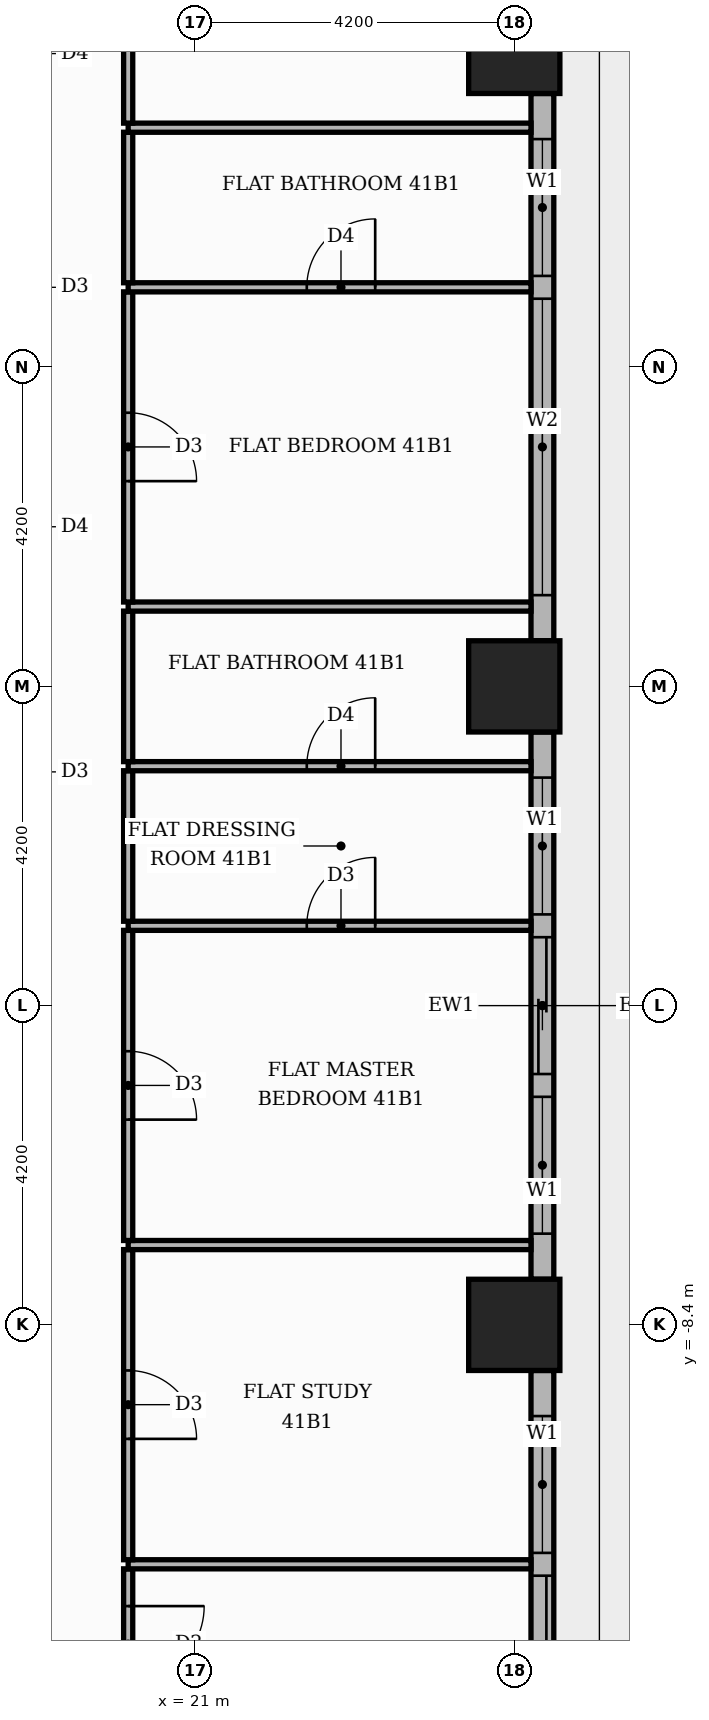
"""IFC4 building model, lengths in metres.
Left out: names, types, materials, properties, quantities, classifications, styles, units other than length and angle.
Written with IfcOpenShell. Run it as: python <this file> out.ifc"""

import sys

from ifc_helpers import new_model, si_unit, direction, frame, frame_2d, origin, origin_2d, place, context, subcontext, project, spatial, rectangle, extrude, element, fill, save


model = new_model("IFC4")
c1 = context("Model", 3, precision=1e-05, world=origin(), true_north=direction((0.0, 1.0)))
c2 = subcontext(c1, "Body", "Model", "MODEL_VIEW")
j1 = project(units=[si_unit("LENGTHUNIT", "METRE"), si_unit("PLANEANGLEUNIT", "RADIAN")], contexts=[c1])
p1 = place(None, origin())
s1 = spatial("IfcSite", under=j1, at=p1, CompositionType="ELEMENT")
p2 = place(p1, origin())
s2 = spatial("IfcBuilding", under=s1, at=p2, CompositionType="ELEMENT")
p3 = place(p2, frame((0.0, 0.0, 172.8)))
s3 = spatial("IfcBuildingStorey", under=s2, at=p3, CompositionType="ELEMENT", Elevation=172.8)
for number, where, z_axis, x_axis in (
    (1, (25.2, 0.0, 0.0), (0.0, 0.0, 1.0), (1.0, 0.0, 0.0)),
    (2, (25.2, 8.4, 0.0), (0.0, 0.0, 1.0), (1.0, 0.0, 0.0)),
    (3, (25.2, -8.4, 0.0), (0.0, 0.0, 1.0), (1.0, 0.0, 0.0)),
):
    element("IfcColumn", number, at=place(p3, frame(where, z_axis=z_axis, x_axis=x_axis)), inside=s3, PredefinedType="COLUMN", context=c2, shape_type="SweptSolid", body=[
        extrude(rectangle(XDim=1.2, YDim=1.2, at=origin_2d()), origin(), (0.0, 0.0, 1.0), 3.9),
    ])
p4 = place(p3, frame((25.57, -16.2, 0.0), z_axis=(0.0, 0.0, 1.0), x_axis=(0.0, 1.0, 0.0)))
e4 = element("IfcWall", 4, at=p4, inside=s3, PredefinedType="STANDARD", context=c2, shape_type="SweptSolid", body=[
    extrude(rectangle(XDim=7.2, YDim=0.3, at=frame_2d((3.6, 0.0))), origin(), (0.0, 0.0, 1.0), 3.48),
])
p5 = place(p4, frame((0.6, 0.0, 0.0)))
e5 = element("IfcOpeningElement", 5, at=p5, cuts=e4, PredefinedType="OPENING", context=c2, shape_type="SweptSolid", body=[
    extrude(rectangle(XDim=3.9, YDim=2.4, at=frame_2d((1.95, 1.2))), frame((0.0, 0.16, 0.0), z_axis=(0.0, -1.0, 0.0), x_axis=(1.0, 0.0, 0.0)), (0.0, 0.0, 1.0), 0.32),
])
p6 = place(p4, frame((4.8, 0.0, 0.9)))
e6 = element("IfcOpeningElement", 6, at=p6, cuts=e4, PredefinedType="OPENING", context=c2, shape_type="SweptSolid", body=[
    extrude(rectangle(XDim=1.8, YDim=2.1, at=frame_2d((0.9, 1.05))), frame((0.0, 0.16, 0.0), z_axis=(0.0, -1.0, 0.0), x_axis=(1.0, 0.0, 0.0)), (0.0, 0.0, 1.0), 0.32),
])
p7 = place(p3, frame((25.57, -7.8, 0.0), z_axis=(0.0, 0.0, 1.0), x_axis=(0.0, 1.0, 0.0)))
e7 = element("IfcWall", 7, at=p7, inside=s3, PredefinedType="STANDARD", context=c2, shape_type="SweptSolid", body=[
    extrude(rectangle(XDim=7.2, YDim=0.3, at=frame_2d((3.6, 0.0))), origin(), (0.0, 0.0, 1.0), 3.48),
])
p8 = place(p7, frame((0.6, 0.0, 0.9)))
e8 = element("IfcOpeningElement", 8, at=p8, cuts=e7, PredefinedType="OPENING", context=c2, shape_type="SweptSolid", body=[
    extrude(rectangle(XDim=1.8, YDim=2.1, at=frame_2d((0.9, 1.05))), frame((0.0, 0.16, 0.0), z_axis=(0.0, -1.0, 0.0), x_axis=(1.0, 0.0, 0.0)), (0.0, 0.0, 1.0), 0.32),
])
p9 = place(p7, frame((2.7, 0.0, 0.0)))
e9 = element("IfcOpeningElement", 9, at=p9, cuts=e7, PredefinedType="OPENING", context=c2, shape_type="SweptSolid", body=[
    extrude(rectangle(XDim=1.8, YDim=2.4, at=frame_2d((0.9, 1.2))), frame((0.0, 0.16, 0.0), z_axis=(0.0, -1.0, 0.0), x_axis=(1.0, 0.0, 0.0)), (0.0, 0.0, 1.0), 0.32),
])
p10 = place(p7, frame((4.8, 0.0, 0.9)))
e10 = element("IfcOpeningElement", 10, at=p10, cuts=e7, PredefinedType="OPENING", context=c2, shape_type="SweptSolid", body=[
    extrude(rectangle(XDim=1.8, YDim=2.1, at=frame_2d((0.9, 1.05))), frame((0.0, 0.16, 0.0), z_axis=(0.0, -1.0, 0.0), x_axis=(1.0, 0.0, 0.0)), (0.0, 0.0, 1.0), 0.32),
])
p11 = place(p3, frame((25.57, 0.6, 0.0), z_axis=(0.0, 0.0, 1.0), x_axis=(0.0, 1.0, 0.0)))
e11 = element("IfcWall", 11, at=p11, inside=s3, PredefinedType="STANDARD", context=c2, shape_type="SweptSolid", body=[
    extrude(rectangle(XDim=7.2, YDim=0.3, at=frame_2d((3.6, 0.0))), origin(), (0.0, 0.0, 1.0), 3.48),
])
p12 = place(p11, frame((0.6, 0.0, 0.9)))
e12 = element("IfcOpeningElement", 12, at=p12, cuts=e11, PredefinedType="OPENING", context=c2, shape_type="SweptSolid", body=[
    extrude(rectangle(XDim=3.9, YDim=2.1, at=frame_2d((1.95, 1.05))), frame((0.0, 0.16, 0.0), z_axis=(0.0, -1.0, 0.0), x_axis=(1.0, 0.0, 0.0)), (0.0, 0.0, 1.0), 0.32),
])
p13 = place(p11, frame((4.8, 0.0, 0.9)))
e13 = element("IfcOpeningElement", 13, at=p13, cuts=e11, PredefinedType="OPENING", context=c2, shape_type="SweptSolid", body=[
    extrude(rectangle(XDim=1.8, YDim=2.1, at=frame_2d((0.9, 1.05))), frame((0.0, 0.16, 0.0), z_axis=(0.0, -1.0, 0.0), x_axis=(1.0, 0.0, 0.0)), (0.0, 0.0, 1.0), 0.32),
])
p14 = place(p3, frame((20.12, -13.59, 0.0), z_axis=(0.0, 0.0, 1.0), x_axis=(0.0, 1.0, 0.0)))
e14 = element("IfcWall", 14, at=p14, inside=s3, PredefinedType="PARTITIONING", context=c2, shape_type="SweptSolid", body=[
    extrude(rectangle(XDim=1.98, YDim=0.12, at=frame_2d((0.99, 0.0))), origin(), (0.0, 0.0, 1.0), 3.48),
])
p15 = place(p14, frame((0.49, 0.0, 0.0)))
e15 = element("IfcOpeningElement", 15, at=p15, cuts=e14, PredefinedType="OPENING", context=c2, shape_type="SweptSolid", body=[
    extrude(rectangle(XDim=1.0, YDim=2.1, at=frame_2d((0.5, 1.05))), frame((0.0, 0.07, 0.0), z_axis=(0.0, -1.0, 0.0), x_axis=(1.0, 0.0, 0.0)), (0.0, 0.0, 1.0), 0.14),
])
p16 = place(p3, frame((20.12, -11.55, 0.0), z_axis=(0.0, 0.0, 1.0), x_axis=(1.0, 0.0, 0.0)))
e16 = element("IfcWall", 16, at=p16, inside=s3, PredefinedType="PARTITIONING", context=c2, shape_type="SweptSolid", body=[
    extrude(rectangle(XDim=5.3, YDim=0.12, at=frame_2d((2.65, 0.0))), origin(), (0.0, 0.0, 1.0), 3.48),
])
p17 = place(p3, frame((20.12, -11.49, 0.0), z_axis=(0.0, 0.0, 1.0), x_axis=(0.0, 1.0, 0.0)))
e17 = element("IfcWall", 17, at=p17, inside=s3, PredefinedType="PARTITIONING", context=c2, shape_type="SweptSolid", body=[
    extrude(rectangle(XDim=4.08, YDim=0.12, at=frame_2d((2.04, 0.0))), origin(), (0.0, 0.0, 1.0), 3.48),
])
p18 = place(p17, frame((1.59, 0.0, 0.0)))
e18 = element("IfcOpeningElement", 18, at=p18, cuts=e17, PredefinedType="OPENING", context=c2, shape_type="SweptSolid", body=[
    extrude(rectangle(XDim=0.9, YDim=2.1, at=frame_2d((0.45, 1.05))), frame((0.0, 0.07, 0.0), z_axis=(0.0, -1.0, 0.0), x_axis=(1.0, 0.0, 0.0)), (0.0, 0.0, 1.0), 0.14),
])
p19 = place(p3, frame((20.12, -7.35, 0.0), z_axis=(0.0, 0.0, 1.0), x_axis=(1.0, 0.0, 0.0)))
e19 = element("IfcWall", 19, at=p19, inside=s3, PredefinedType="PARTITIONING", context=c2, shape_type="SweptSolid", body=[
    extrude(rectangle(XDim=5.3, YDim=0.12, at=frame_2d((2.65, 0.0))), origin(), (0.0, 0.0, 1.0), 3.48),
])
p20 = place(p3, frame((20.12, -7.29, 0.0), z_axis=(0.0, 0.0, 1.0), x_axis=(0.0, 1.0, 0.0)))
e20 = element("IfcWall", 20, at=p20, inside=s3, PredefinedType="PARTITIONING", context=c2, shape_type="SweptSolid", body=[
    extrude(rectangle(XDim=4.08, YDim=0.12, at=frame_2d((2.04, 0.0))), origin(), (0.0, 0.0, 1.0), 3.48),
])
p21 = place(p20, frame((1.59, 0.0, 0.0)))
e21 = element("IfcOpeningElement", 21, at=p21, cuts=e20, PredefinedType="OPENING", context=c2, shape_type="SweptSolid", body=[
    extrude(rectangle(XDim=0.9, YDim=2.1, at=frame_2d((0.45, 1.05))), frame((0.0, 0.07, 0.0), z_axis=(0.0, -1.0, 0.0), x_axis=(1.0, 0.0, 0.0)), (0.0, 0.0, 1.0), 0.14),
])
p22 = place(p3, frame((20.12, -3.15, 0.0), z_axis=(0.0, 0.0, 1.0), x_axis=(1.0, 0.0, 0.0)))
e22 = element("IfcWall", 22, at=p22, inside=s3, PredefinedType="PARTITIONING", context=c2, shape_type="SweptSolid", body=[
    extrude(rectangle(XDim=5.3, YDim=0.12, at=frame_2d((2.65, 0.0))), origin(), (0.0, 0.0, 1.0), 3.48),
])
p23 = place(p22, frame((2.35, 0.0, 0.0)))
e23 = element("IfcOpeningElement", 23, at=p23, cuts=e22, PredefinedType="OPENING", context=c2, shape_type="SweptSolid", body=[
    extrude(rectangle(XDim=0.9, YDim=2.1, at=frame_2d((0.45, 1.05))), frame((0.0, 0.07, 0.0), z_axis=(0.0, -1.0, 0.0), x_axis=(1.0, 0.0, 0.0)), (0.0, 0.0, 1.0), 0.14),
])
p24 = place(p3, frame((20.12, -3.09, 0.0), z_axis=(0.0, 0.0, 1.0), x_axis=(0.0, 1.0, 0.0)))
e24 = element("IfcWall", 24, at=p24, inside=s3, PredefinedType="PARTITIONING", context=c2, shape_type="SweptSolid", body=[
    extrude(rectangle(XDim=1.98, YDim=0.12, at=frame_2d((0.99, 0.0))), origin(), (0.0, 0.0, 1.0), 3.48),
])
p25 = place(p3, frame((20.12, -1.05, 0.0), z_axis=(0.0, 0.0, 1.0), x_axis=(1.0, 0.0, 0.0)))
e25 = element("IfcWall", 25, at=p25, inside=s3, PredefinedType="PARTITIONING", context=c2, shape_type="SweptSolid", body=[
    extrude(rectangle(XDim=5.3, YDim=0.12, at=frame_2d((2.65, 0.0))), origin(), (0.0, 0.0, 1.0), 3.48),
])
p26 = place(p25, frame((2.35, 0.0, 0.0)))
e26 = element("IfcOpeningElement", 26, at=p26, cuts=e25, PredefinedType="OPENING", context=c2, shape_type="SweptSolid", body=[
    extrude(rectangle(XDim=0.9, YDim=2.1, at=frame_2d((0.45, 1.05))), frame((0.0, 0.07, 0.0), z_axis=(0.0, -1.0, 0.0), x_axis=(1.0, 0.0, 0.0)), (0.0, 0.0, 1.0), 0.14),
])
p27 = place(p3, frame((20.12, -0.99, 0.0), z_axis=(0.0, 0.0, 1.0), x_axis=(0.0, 1.0, 0.0)))
e27 = element("IfcWall", 27, at=p27, inside=s3, PredefinedType="PARTITIONING", context=c2, shape_type="SweptSolid", body=[
    extrude(rectangle(XDim=1.98, YDim=0.12, at=frame_2d((0.99, 0.0))), origin(), (0.0, 0.0, 1.0), 3.48),
])
p28 = place(p3, frame((20.12, 1.05, 0.0), z_axis=(0.0, 0.0, 1.0), x_axis=(1.0, 0.0, 0.0)))
e28 = element("IfcWall", 28, at=p28, inside=s3, PredefinedType="PARTITIONING", context=c2, shape_type="SweptSolid", body=[
    extrude(rectangle(XDim=5.3, YDim=0.12, at=frame_2d((2.65, 0.0))), origin(), (0.0, 0.0, 1.0), 3.48),
])
p29 = place(p3, frame((20.12, 1.11, 0.0), z_axis=(0.0, 0.0, 1.0), x_axis=(0.0, 1.0, 0.0)))
e29 = element("IfcWall", 29, at=p29, inside=s3, PredefinedType="PARTITIONING", context=c2, shape_type="SweptSolid", body=[
    extrude(rectangle(XDim=4.08, YDim=0.12, at=frame_2d((2.04, 0.0))), origin(), (0.0, 0.0, 1.0), 3.48),
])
p30 = place(p29, frame((1.59, 0.0, 0.0)))
e30 = element("IfcOpeningElement", 30, at=p30, cuts=e29, PredefinedType="OPENING", context=c2, shape_type="SweptSolid", body=[
    extrude(rectangle(XDim=0.9, YDim=2.1, at=frame_2d((0.45, 1.05))), frame((0.0, 0.07, 0.0), z_axis=(0.0, -1.0, 0.0), x_axis=(1.0, 0.0, 0.0)), (0.0, 0.0, 1.0), 0.14),
])
p31 = place(p3, frame((20.12, 5.25, 0.0), z_axis=(0.0, 0.0, 1.0), x_axis=(1.0, 0.0, 0.0)))
e31 = element("IfcWall", 31, at=p31, inside=s3, PredefinedType="PARTITIONING", context=c2, shape_type="SweptSolid", body=[
    extrude(rectangle(XDim=5.3, YDim=0.12, at=frame_2d((2.65, 0.0))), origin(), (0.0, 0.0, 1.0), 3.48),
])
p32 = place(p31, frame((2.35, 0.0, 0.0)))
e32 = element("IfcOpeningElement", 32, at=p32, cuts=e31, PredefinedType="OPENING", context=c2, shape_type="SweptSolid", body=[
    extrude(rectangle(XDim=0.9, YDim=2.1, at=frame_2d((0.45, 1.05))), frame((0.0, 0.07, 0.0), z_axis=(0.0, -1.0, 0.0), x_axis=(1.0, 0.0, 0.0)), (0.0, 0.0, 1.0), 0.14),
])
p33 = place(p3, frame((20.12, 5.31, 0.0), z_axis=(0.0, 0.0, 1.0), x_axis=(0.0, 1.0, 0.0)))
e33 = element("IfcWall", 33, at=p33, inside=s3, PredefinedType="PARTITIONING", context=c2, shape_type="SweptSolid", body=[
    extrude(rectangle(XDim=1.98, YDim=0.12, at=frame_2d((0.99, 0.0))), origin(), (0.0, 0.0, 1.0), 3.48),
])
p34 = place(p3, frame((20.12, 7.35, 0.0), z_axis=(0.0, 0.0, 1.0), x_axis=(1.0, 0.0, 0.0)))
e34 = element("IfcWall", 34, at=p34, inside=s3, PredefinedType="PARTITIONING", context=c2, shape_type="SweptSolid", body=[
    extrude(rectangle(XDim=5.3, YDim=0.12, at=frame_2d((2.65, 0.0))), origin(), (0.0, 0.0, 1.0), 3.48),
])
p35 = place(p3, frame((20.12, 7.41, 0.0), z_axis=(0.0, 0.0, 1.0), x_axis=(0.0, 1.0, 0.0)))
e35 = element("IfcWall", 35, at=p35, inside=s3, PredefinedType="PARTITIONING", context=c2, shape_type="SweptSolid", body=[
    extrude(rectangle(XDim=4.08, YDim=0.12, at=frame_2d((2.04, 0.0))), origin(), (0.0, 0.0, 1.0), 3.48),
])
p36 = place(p35, frame((1.59, 0.0, 0.0)))
e36 = element("IfcOpeningElement", 36, at=p36, cuts=e35, PredefinedType="OPENING", context=c2, shape_type="SweptSolid", body=[
    extrude(rectangle(XDim=0.9, YDim=2.1, at=frame_2d((0.45, 1.05))), frame((0.0, 0.07, 0.0), z_axis=(0.0, -1.0, 0.0), x_axis=(1.0, 0.0, 0.0)), (0.0, 0.0, 1.0), 0.14),
])
p37 = place(p5, origin())
e37 = element("IfcDoor", 37, at=p37, inside=s3, OperationType="SLIDING_TO_LEFT", PredefinedType="DOOR", context=c2, shape_type="SweptSolid", body=[
    extrude(rectangle(XDim=3.9, YDim=2.4, at=frame_2d((1.95, 1.2))), frame((0.0, 0.025, 0.0), z_axis=(0.0, -1.0, 0.0), x_axis=(1.0, 0.0, 0.0)), (0.0, 0.0, 1.0), 0.05),
])
fill(e5, e37)
p38 = place(p6, origin())
e38 = element("IfcWindow", 38, at=p38, inside=s3, PartitioningType="SINGLE_PANEL", PredefinedType="WINDOW", context=c2, shape_type="SweptSolid", body=[
    extrude(rectangle(XDim=1.8, YDim=2.1, at=frame_2d((0.9, 1.05))), frame((0.0, 0.03, 0.0), z_axis=(0.0, -1.0, 0.0), x_axis=(1.0, 0.0, 0.0)), (0.0, 0.0, 1.0), 0.06),
])
fill(e6, e38)
p39 = place(p8, origin())
e39 = element("IfcWindow", 39, at=p39, inside=s3, PartitioningType="SINGLE_PANEL", PredefinedType="WINDOW", context=c2, shape_type="SweptSolid", body=[
    extrude(rectangle(XDim=1.8, YDim=2.1, at=frame_2d((0.9, 1.05))), frame((0.0, 0.03, 0.0), z_axis=(0.0, -1.0, 0.0), x_axis=(1.0, 0.0, 0.0)), (0.0, 0.0, 1.0), 0.06),
])
fill(e8, e39)
p40 = place(p9, origin())
e40 = element("IfcDoor", 40, at=p40, inside=s3, OperationType="SLIDING_TO_LEFT", PredefinedType="DOOR", context=c2, shape_type="SweptSolid", body=[
    extrude(rectangle(XDim=1.8, YDim=2.4, at=frame_2d((0.9, 1.2))), frame((0.0, 0.025, 0.0), z_axis=(0.0, -1.0, 0.0), x_axis=(1.0, 0.0, 0.0)), (0.0, 0.0, 1.0), 0.05),
])
fill(e9, e40)
p41 = place(p10, origin())
e41 = element("IfcWindow", 41, at=p41, inside=s3, PartitioningType="SINGLE_PANEL", PredefinedType="WINDOW", context=c2, shape_type="SweptSolid", body=[
    extrude(rectangle(XDim=1.8, YDim=2.1, at=frame_2d((0.9, 1.05))), frame((0.0, 0.03, 0.0), z_axis=(0.0, -1.0, 0.0), x_axis=(1.0, 0.0, 0.0)), (0.0, 0.0, 1.0), 0.06),
])
fill(e10, e41)
p42 = place(p12, origin())
e42 = element("IfcWindow", 42, at=p42, inside=s3, PartitioningType="SINGLE_PANEL", PredefinedType="WINDOW", context=c2, shape_type="SweptSolid", body=[
    extrude(rectangle(XDim=3.9, YDim=2.1, at=frame_2d((1.95, 1.05))), frame((0.0, 0.03, 0.0), z_axis=(0.0, -1.0, 0.0), x_axis=(1.0, 0.0, 0.0)), (0.0, 0.0, 1.0), 0.06),
])
fill(e12, e42)
p43 = place(p13, origin())
e43 = element("IfcWindow", 43, at=p43, inside=s3, PartitioningType="SINGLE_PANEL", PredefinedType="WINDOW", context=c2, shape_type="SweptSolid", body=[
    extrude(rectangle(XDim=1.8, YDim=2.1, at=frame_2d((0.9, 1.05))), frame((0.0, 0.03, 0.0), z_axis=(0.0, -1.0, 0.0), x_axis=(1.0, 0.0, 0.0)), (0.0, 0.0, 1.0), 0.06),
])
fill(e13, e43)
p44 = place(p15, frame((1.0, 0.0, 0.0), z_axis=(0.0, 0.0, 1.0), x_axis=(-1.0, 0.0, 0.0)))
e44 = element("IfcDoor", 44, at=p44, inside=s3, OperationType="SINGLE_SWING_RIGHT", PredefinedType="DOOR", context=c2, shape_type="SweptSolid", body=[
    extrude(rectangle(XDim=1.0, YDim=2.1, at=frame_2d((0.5, 1.05))), frame((0.0, 0.025, 0.0), z_axis=(0.0, -1.0, 0.0), x_axis=(1.0, 0.0, 0.0)), (0.0, 0.0, 1.0), 0.05),
])
fill(e15, e44)
p45 = place(p18, frame((0.9, 0.0, 0.0), z_axis=(0.0, 0.0, 1.0), x_axis=(-1.0, 0.0, 0.0)))
e45 = element("IfcDoor", 45, at=p45, inside=s3, OperationType="SINGLE_SWING_LEFT", PredefinedType="DOOR", context=c2, shape_type="SweptSolid", body=[
    extrude(rectangle(XDim=0.9, YDim=2.1, at=frame_2d((0.45, 1.05))), frame((0.0, 0.025, 0.0), z_axis=(0.0, -1.0, 0.0), x_axis=(1.0, 0.0, 0.0)), (0.0, 0.0, 1.0), 0.05),
])
fill(e18, e45)
p46 = place(p21, frame((0.9, 0.0, 0.0), z_axis=(0.0, 0.0, 1.0), x_axis=(-1.0, 0.0, 0.0)))
e46 = element("IfcDoor", 46, at=p46, inside=s3, OperationType="SINGLE_SWING_LEFT", PredefinedType="DOOR", context=c2, shape_type="SweptSolid", body=[
    extrude(rectangle(XDim=0.9, YDim=2.1, at=frame_2d((0.45, 1.05))), frame((0.0, 0.025, 0.0), z_axis=(0.0, -1.0, 0.0), x_axis=(1.0, 0.0, 0.0)), (0.0, 0.0, 1.0), 0.05),
])
fill(e21, e46)
p47 = place(p23, origin())
e47 = element("IfcDoor", 47, at=p47, inside=s3, OperationType="SINGLE_SWING_RIGHT", PredefinedType="DOOR", context=c2, shape_type="SweptSolid", body=[
    extrude(rectangle(XDim=0.9, YDim=2.1, at=frame_2d((0.45, 1.05))), frame((0.0, 0.025, 0.0), z_axis=(0.0, -1.0, 0.0), x_axis=(1.0, 0.0, 0.0)), (0.0, 0.0, 1.0), 0.05),
])
fill(e23, e47)
p48 = place(p26, origin())
e48 = element("IfcDoor", 48, at=p48, inside=s3, OperationType="SINGLE_SWING_RIGHT", PredefinedType="DOOR", context=c2, shape_type="SweptSolid", body=[
    extrude(rectangle(XDim=0.9, YDim=2.1, at=frame_2d((0.45, 1.05))), frame((0.0, 0.025, 0.0), z_axis=(0.0, -1.0, 0.0), x_axis=(1.0, 0.0, 0.0)), (0.0, 0.0, 1.0), 0.05),
])
fill(e26, e48)
p49 = place(p30, frame((0.9, 0.0, 0.0), z_axis=(0.0, 0.0, 1.0), x_axis=(-1.0, 0.0, 0.0)))
e49 = element("IfcDoor", 49, at=p49, inside=s3, OperationType="SINGLE_SWING_LEFT", PredefinedType="DOOR", context=c2, shape_type="SweptSolid", body=[
    extrude(rectangle(XDim=0.9, YDim=2.1, at=frame_2d((0.45, 1.05))), frame((0.0, 0.025, 0.0), z_axis=(0.0, -1.0, 0.0), x_axis=(1.0, 0.0, 0.0)), (0.0, 0.0, 1.0), 0.05),
])
fill(e30, e49)
p50 = place(p32, origin())
e50 = element("IfcDoor", 50, at=p50, inside=s3, OperationType="SINGLE_SWING_RIGHT", PredefinedType="DOOR", context=c2, shape_type="SweptSolid", body=[
    extrude(rectangle(XDim=0.9, YDim=2.1, at=frame_2d((0.45, 1.05))), frame((0.0, 0.025, 0.0), z_axis=(0.0, -1.0, 0.0), x_axis=(1.0, 0.0, 0.0)), (0.0, 0.0, 1.0), 0.05),
])
fill(e32, e50)
save(model, sys.argv[1])
